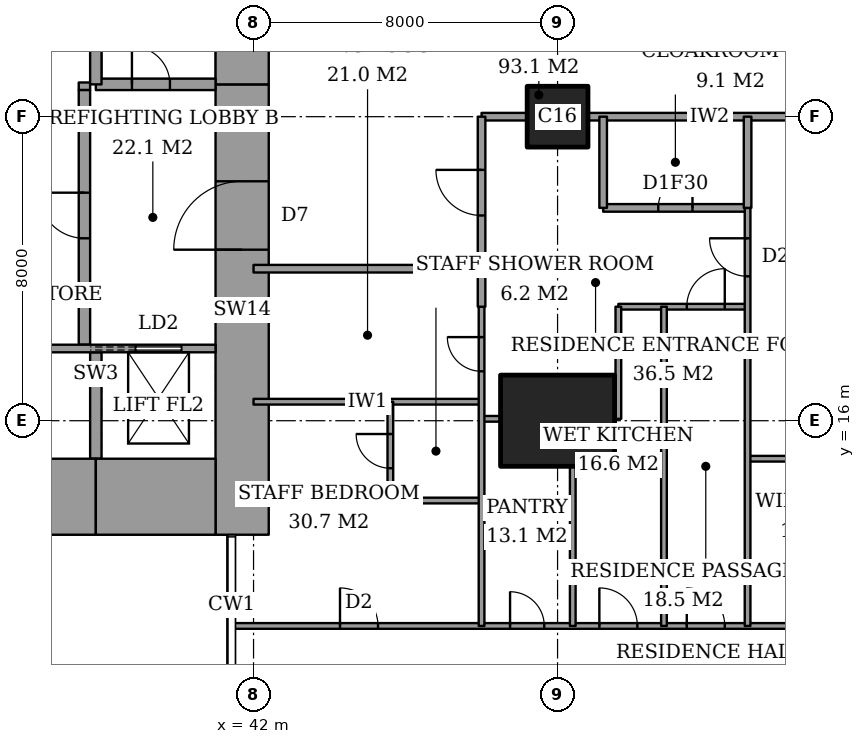
"""IFC4 building model, lengths in metres.
Left out: names, types, materials, properties, quantities, classifications, styles, units other than length and angle.
Written with IfcOpenShell. Run it as: python <this file> out.ifc"""

import sys

from ifc_helpers import new_model, si_unit, direction, frame, frame_2d, origin, origin_2d, place, context, subcontext, project, spatial, rectangle, extrude, element, fill, save


model = new_model("IFC4")
c1 = context("Model", 3, precision=1e-05, world=origin(), true_north=direction((0.0, 1.0)))
c2 = subcontext(c1, "Body", "Model", "MODEL_VIEW")
j1 = project(units=[si_unit("LENGTHUNIT", "METRE"), si_unit("PLANEANGLEUNIT", "RADIAN")], contexts=[c1])
p1 = place(None, origin())
s1 = spatial("IfcSite", under=j1, at=p1, CompositionType="ELEMENT")
p2 = place(p1, origin())
s2 = spatial("IfcBuilding", under=s1, at=p2, CompositionType="ELEMENT")
p3 = place(p2, frame((0.0, 0.0, 248.4)))
s3 = spatial("IfcBuildingStorey", under=s2, at=p3, CompositionType="ELEMENT", Elevation=248.4)
p4 = place(p3, frame((50.0, 16.0, 0.0), z_axis=(0.0, 0.0, 1.0), x_axis=(1.0, 0.0, 0.0)))
e1 = element("IfcColumn", 1, at=p4, inside=s3, PredefinedType="COLUMN", context=c2, shape_type="SweptSolid", body=[
    extrude(rectangle(XDim=3.0, YDim=2.4, at=origin_2d()), origin(), (0.0, 0.0, 1.0), 3.6),
])
p5 = place(p3, frame((50.0, 24.0, 0.0), z_axis=(0.0, 0.0, 1.0), x_axis=(1.0, 0.0, 0.0)))
e2 = element("IfcColumn", 2, at=p5, inside=s3, PredefinedType="COLUMN", context=c2, shape_type="SweptSolid", body=[
    extrude(rectangle(XDim=1.6, YDim=1.6, at=origin_2d()), origin(), (0.0, 0.0, 1.0), 3.6),
])
p6 = place(p3, frame((28.15, 14.0, 0.0), z_axis=(0.0, 0.0, 1.0), x_axis=(1.0, 0.0, 0.0)))
e3 = element("IfcWall", 3, at=p6, inside=s3, PredefinedType="SHEAR", context=c2, shape_type="SweptSolid", body=[
    extrude(rectangle(XDim=9.7, YDim=2.0, at=frame_2d((4.85, 0.0))), origin(), (0.0, 0.0, 1.0), 3.6),
])
p7 = place(p3, frame((37.85, 14.0, 0.0), z_axis=(0.0, 0.0, 1.0), x_axis=(1.0, 0.0, 0.0)))
e4 = element("IfcWall", 4, at=p7, inside=s3, PredefinedType="SHEAR", context=c2, shape_type="SweptSolid", body=[
    extrude(rectangle(XDim=3.15, YDim=2.0, at=frame_2d((1.575, 0.0))), origin(), (0.0, 0.0, 1.0), 3.6),
])
p8 = place(p3, frame((41.7, 13.0, 0.0), z_axis=(0.0, 0.0, 1.0), x_axis=(0.0, 1.0, 0.0)))
e5 = element("IfcWall", 5, at=p8, inside=s3, PredefinedType="SHEAR", context=c2, shape_type="SweptSolid", body=[
    extrude(rectangle(XDim=11.85, YDim=1.4, at=frame_2d((5.925, 0.0))), origin(), (0.0, 0.0, 1.0), 3.6),
])
p9 = place(p8, frame((7.5, 0.0, 0.0)))
e6 = element("IfcOpeningElement", 6, at=p9, cuts=e5, PredefinedType="OPENING", context=c2, shape_type="SweptSolid", body=[
    extrude(rectangle(XDim=1.8, YDim=2.4, at=frame_2d((0.9, 1.2))), frame((0.0, 0.71, 0.0), z_axis=(0.0, -1.0, 0.0), x_axis=(1.0, 0.0, 0.0)), (0.0, 0.0, 1.0), 1.42),
])
p10 = place(p3, frame((41.7, 24.85, 0.0), z_axis=(0.0, 0.0, 1.0), x_axis=(0.0, 1.0, 0.0)))
e7 = element("IfcWall", 7, at=p10, inside=s3, PredefinedType="SHEAR", context=c2, shape_type="SweptSolid", body=[
    extrude(rectangle(XDim=10.15, YDim=1.4, at=frame_2d((5.075, 0.0))), origin(), (0.0, 0.0, 1.0), 3.6),
])
p11 = place(p3, frame((37.85, 24.85, 0.0), z_axis=(0.0, 0.0, 1.0), x_axis=(0.0, 1.0, 0.0)))
e8 = element("IfcWall", 8, at=p11, inside=s3, PredefinedType="SHEAR", context=c2, shape_type="SweptSolid", body=[
    extrude(rectangle(XDim=8.15, YDim=0.3, at=frame_2d((4.075, 0.0))), origin(), (0.0, 0.0, 1.0), 3.6),
])
p12 = place(p3, frame((37.85, 24.85, 0.0), z_axis=(0.0, 0.0, 1.0), x_axis=(1.0, 0.0, 0.0)))
e9 = element("IfcWall", 9, at=p12, inside=s3, PredefinedType="SHEAR", context=c2, shape_type="SweptSolid", body=[
    extrude(rectangle(XDim=3.15, YDim=0.3, at=frame_2d((1.575, 0.0))), origin(), (0.0, 0.0, 1.0), 3.6),
])
p13 = place(p12, frame((0.95, 0.0, 0.0)))
e10 = element("IfcOpeningElement", 10, at=p13, cuts=e9, PredefinedType="OPENING", context=c2, shape_type="SweptSolid", body=[
    extrude(rectangle(XDim=1.0, YDim=2.1, at=frame_2d((0.5, 1.05))), frame((0.0, 0.16, 0.0), z_axis=(0.0, -1.0, 0.0), x_axis=(1.0, 0.0, 0.0)), (0.0, 0.0, 1.0), 0.32),
])
p14 = place(p3, frame((37.55, 18.0, 0.0), z_axis=(0.0, 0.0, 1.0), x_axis=(0.0, 1.0, 0.0)))
e11 = element("IfcWall", 11, at=p14, inside=s3, PredefinedType="PARTITIONING", context=c2, shape_type="SweptSolid", body=[
    extrude(rectangle(XDim=6.7, YDim=0.3, at=frame_2d((3.35, 0.0))), origin(), (0.0, 0.0, 1.0), 3.6),
])
p15 = place(p14, frame((2.8, 0.0, 0.0)))
e12 = element("IfcOpeningElement", 12, at=p15, cuts=e11, PredefinedType="OPENING", context=c2, shape_type="SweptSolid", body=[
    extrude(rectangle(XDim=1.2, YDim=2.1, at=frame_2d((0.6, 1.05))), frame((0.0, 0.16, 0.0), z_axis=(0.0, -1.0, 0.0), x_axis=(1.0, 0.0, 0.0)), (0.0, 0.0, 1.0), 0.32),
])
p16 = place(p3, frame((41.439, 10.6, 0.0), z_axis=(0.0, 0.0, 1.0), x_axis=(1.0, 0.0, 0.0)))
e13 = element("IfcWall", 13, at=p16, inside=s3, PredefinedType="PARTITIONING", context=c2, shape_type="SweptSolid", body=[
    extrude(rectangle(XDim=25.011, YDim=0.15, at=frame_2d((12.505, 0.0))), origin(), (0.0, 0.0, 1.0), 3.35),
])
p17 = place(p16, frame((11.961, 0.0, 0.0)))
e14 = element("IfcOpeningElement", 14, at=p17, cuts=e13, PredefinedType="OPENING", context=c2, shape_type="SweptSolid", body=[
    extrude(rectangle(XDim=1.0, YDim=2.1, at=frame_2d((0.5, 1.05))), frame((0.0, 0.085, 0.0), z_axis=(0.0, -1.0, 0.0), x_axis=(1.0, 0.0, 0.0)), (0.0, 0.0, 1.0), 0.17),
])
p18 = place(p16, frame((20.924, 0.0, 0.0)))
e15 = element("IfcOpeningElement", 15, at=p18, cuts=e13, PredefinedType="OPENING", context=c2, shape_type="SweptSolid", body=[
    extrude(rectangle(XDim=1.0, YDim=2.1, at=frame_2d((0.5, 1.05))), frame((0.0, 0.085, 0.0), z_axis=(0.0, -1.0, 0.0), x_axis=(1.0, 0.0, 0.0)), (0.0, 0.0, 1.0), 0.17),
])
p19 = place(p16, frame((15.249, 0.0, 0.0)))
e16 = element("IfcOpeningElement", 16, at=p19, cuts=e13, PredefinedType="OPENING", context=c2, shape_type="SweptSolid", body=[
    extrude(rectangle(XDim=0.9, YDim=2.1, at=frame_2d((0.45, 1.05))), frame((0.0, 0.085, 0.0), z_axis=(0.0, -1.0, 0.0), x_axis=(1.0, 0.0, 0.0)), (0.0, 0.0, 1.0), 0.17),
])
p20 = place(p16, frame((9.661, 0.0, 0.0)))
e17 = element("IfcOpeningElement", 17, at=p20, cuts=e13, PredefinedType="OPENING", context=c2, shape_type="SweptSolid", body=[
    extrude(rectangle(XDim=1.0, YDim=2.1, at=frame_2d((0.5, 1.05))), frame((0.0, 0.085, 0.0), z_axis=(0.0, -1.0, 0.0), x_axis=(1.0, 0.0, 0.0)), (0.0, 0.0, 1.0), 0.17),
])
p21 = place(p16, frame((7.311, 0.0, 0.0)))
e18 = element("IfcOpeningElement", 18, at=p21, cuts=e13, PredefinedType="OPENING", context=c2, shape_type="SweptSolid", body=[
    extrude(rectangle(XDim=0.9, YDim=2.1, at=frame_2d((0.45, 1.05))), frame((0.0, 0.085, 0.0), z_axis=(0.0, -1.0, 0.0), x_axis=(1.0, 0.0, 0.0)), (0.0, 0.0, 1.0), 0.17),
])
p22 = place(p16, frame((2.836, 0.0, 0.0)))
e19 = element("IfcOpeningElement", 19, at=p22, cuts=e13, PredefinedType="OPENING", context=c2, shape_type="SweptSolid", body=[
    extrude(rectangle(XDim=1.0, YDim=2.1, at=frame_2d((0.5, 1.05))), frame((0.0, 0.085, 0.0), z_axis=(0.0, -1.0, 0.0), x_axis=(1.0, 0.0, 0.0)), (0.0, 0.0, 1.0), 0.17),
])
p23 = place(p3, frame((45.6, 13.9, 0.0), z_axis=(0.0, 0.0, 1.0), x_axis=(1.0, 0.0, 0.0)))
e20 = element("IfcWall", 20, at=p23, inside=s3, PredefinedType="PARTITIONING", context=c2, shape_type="SweptSolid", body=[
    extrude(rectangle(XDim=2.4, YDim=0.15, at=frame_2d((1.2, 0.0))), origin(), (0.0, 0.0, 1.0), 3.35),
])
p24 = place(p3, frame((55.0, 15.0, 0.0), z_axis=(0.0, 0.0, 1.0), x_axis=(1.0, 0.0, 0.0)))
e21 = element("IfcWall", 21, at=p24, inside=s3, PredefinedType="PARTITIONING", context=c2, shape_type="SweptSolid", body=[
    extrude(rectangle(XDim=1.5, YDim=0.15, at=frame_2d((0.75, 0.0))), origin(), (0.0, 0.0, 1.0), 3.35),
])
p25 = place(p3, frame((48.0, 16.05, 0.0), z_axis=(0.0, 0.0, 1.0), x_axis=(1.0, 0.0, 0.0)))
e22 = element("IfcWall", 22, at=p25, inside=s3, PredefinedType="PARTITIONING", context=c2, shape_type="SweptSolid", body=[
    extrude(rectangle(XDim=0.5, YDim=0.15, at=frame_2d((0.25, 0.0))), origin(), (0.0, 0.0, 1.0), 2.634),
])
p26 = place(p3, frame((42.0, 16.5, 0.0), z_axis=(0.0, 0.0, 1.0), x_axis=(1.0, 0.0, 0.0)))
e23 = element("IfcWall", 23, at=p26, inside=s3, PredefinedType="PARTITIONING", context=c2, shape_type="SweptSolid", body=[
    extrude(rectangle(XDim=6.0, YDim=0.15, at=frame_2d((3.0, 0.0))), origin(), (0.0, 0.0, 1.0), 3.35),
])
p27 = place(p3, frame((51.6, 19.0, 0.0), z_axis=(0.0, 0.0, 1.0), x_axis=(1.0, 0.0, 0.0)))
e24 = element("IfcWall", 24, at=p27, inside=s3, PredefinedType="PARTITIONING", context=c2, shape_type="SweptSolid", body=[
    extrude(rectangle(XDim=3.4, YDim=0.15, at=frame_2d((1.7, 0.0))), origin(), (0.0, 0.0, 1.0), 3.35),
])
p28 = place(p27, frame((1.8, 0.0, 0.0)))
e25 = element("IfcOpeningElement", 25, at=p28, cuts=e24, PredefinedType="OPENING", context=c2, shape_type="SweptSolid", body=[
    extrude(rectangle(XDim=1.0, YDim=2.1, at=frame_2d((0.5, 1.05))), frame((0.0, 0.085, 0.0), z_axis=(0.0, -1.0, 0.0), x_axis=(1.0, 0.0, 0.0)), (0.0, 0.0, 1.0), 0.17),
])
p29 = place(p3, frame((42.0, 20.0, 0.0), z_axis=(0.0, 0.0, 1.0), x_axis=(1.0, 0.0, 0.0)))
e26 = element("IfcWall", 26, at=p29, inside=s3, PredefinedType="PARTITIONING", context=c2, shape_type="SweptSolid", body=[
    extrude(rectangle(XDim=6.0, YDim=0.2, at=frame_2d((3.0, 0.0))), origin(), (0.0, 0.0, 1.0), 3.35),
])
p30 = place(p3, frame((51.2, 21.6, 0.0), z_axis=(0.0, 0.0, 1.0), x_axis=(1.0, 0.0, 0.0)))
e27 = element("IfcWall", 27, at=p30, inside=s3, PredefinedType="PARTITIONING", context=c2, shape_type="SweptSolid", body=[
    extrude(rectangle(XDim=3.8, YDim=0.2, at=frame_2d((1.9, 0.0))), origin(), (0.0, 0.0, 1.0), 3.35),
])
p31 = place(p30, frame((1.45, 0.0, 0.0)))
e28 = element("IfcOpeningElement", 28, at=p31, cuts=e27, PredefinedType="OPENING", context=c2, shape_type="SweptSolid", body=[
    extrude(rectangle(XDim=0.9, YDim=2.1, at=frame_2d((0.45, 1.05))), frame((0.0, 0.11, 0.0), z_axis=(0.0, -1.0, 0.0), x_axis=(1.0, 0.0, 0.0)), (0.0, 0.0, 1.0), 0.22),
])
p32 = place(p3, frame((48.0, 24.0, 0.0), z_axis=(0.0, 0.0, 1.0), x_axis=(1.0, 0.0, 0.0)))
e29 = element("IfcWall", 29, at=p32, inside=s3, PredefinedType="PARTITIONING", context=c2, shape_type="SweptSolid", body=[
    extrude(rectangle(XDim=1.2, YDim=0.2, at=frame_2d((0.6, 0.0))), origin(), (0.0, 0.0, 1.0), 3.35),
])
p33 = place(p3, frame((50.8, 24.0, 0.0), z_axis=(0.0, 0.0, 1.0), x_axis=(1.0, 0.0, 0.0)))
e30 = element("IfcWall", 30, at=p33, inside=s3, PredefinedType="PARTITIONING", context=c2, shape_type="SweptSolid", body=[
    extrude(rectangle(XDim=6.4, YDim=0.2, at=frame_2d((3.2, 0.0))), origin(), (0.0, 0.0, 1.0), 3.35),
])
p34 = place(p3, frame((45.6, 13.9, 0.0), z_axis=(0.0, 0.0, 1.0), x_axis=(0.0, 1.0, 0.0)))
e31 = element("IfcWall", 31, at=p34, inside=s3, PredefinedType="PARTITIONING", context=c2, shape_type="SweptSolid", body=[
    extrude(rectangle(XDim=2.6, YDim=0.15, at=frame_2d((1.3, 0.0))), origin(), (0.0, 0.0, 1.0), 3.35),
])
p35 = place(p34, frame((0.85, 0.0, 0.0)))
e32 = element("IfcOpeningElement", 32, at=p35, cuts=e31, PredefinedType="OPENING", context=c2, shape_type="SweptSolid", body=[
    extrude(rectangle(XDim=0.9, YDim=2.1, at=frame_2d((0.45, 1.05))), frame((0.0, 0.085, 0.0), z_axis=(0.0, -1.0, 0.0), x_axis=(1.0, 0.0, 0.0)), (0.0, 0.0, 1.0), 0.17),
])
p36 = place(p3, frame((48.0, 19.0, 0.0), z_axis=(0.0, 0.0, 1.0), x_axis=(0.0, 1.0, 0.0)))
e33 = element("IfcWall", 33, at=p36, inside=s3, PredefinedType="PARTITIONING", context=c2, shape_type="SweptSolid", body=[
    extrude(rectangle(XDim=5.0, YDim=0.2, at=frame_2d((2.5, 0.0))), origin(), (0.0, 0.0, 1.0), 3.35),
])
p37 = place(p36, frame((2.4, 0.0, 0.0)))
e34 = element("IfcOpeningElement", 34, at=p37, cuts=e33, PredefinedType="OPENING", context=c2, shape_type="SweptSolid", body=[
    extrude(rectangle(XDim=1.2, YDim=2.4, at=frame_2d((0.6, 1.2))), frame((0.0, 0.11, 0.0), z_axis=(0.0, -1.0, 0.0), x_axis=(1.0, 0.0, 0.0)), (0.0, 0.0, 1.0), 0.22),
])
p38 = place(p3, frame((48.0, 10.6, 0.0), z_axis=(0.0, 0.0, 1.0), x_axis=(0.0, 1.0, 0.0)))
e35 = element("IfcWall", 35, at=p38, inside=s3, PredefinedType="PARTITIONING", context=c2, shape_type="SweptSolid", body=[
    extrude(rectangle(XDim=8.4, YDim=0.15, at=frame_2d((4.2, 0.0))), origin(), (0.0, 0.0, 1.0), 3.35),
])
p39 = place(p38, frame((6.7, 0.0, 0.0)))
e36 = element("IfcOpeningElement", 36, at=p39, cuts=e35, PredefinedType="OPENING", context=c2, shape_type="SweptSolid", body=[
    extrude(rectangle(XDim=0.9, YDim=2.1, at=frame_2d((0.45, 1.05))), frame((0.0, 0.085, 0.0), z_axis=(0.0, -1.0, 0.0), x_axis=(1.0, 0.0, 0.0)), (0.0, 0.0, 1.0), 0.17),
])
p40 = place(p3, frame((50.4, 10.6, 0.0), z_axis=(0.0, 0.0, 1.0), x_axis=(0.0, 1.0, 0.0)))
e37 = element("IfcWall", 37, at=p40, inside=s3, PredefinedType="PARTITIONING", context=c2, shape_type="SweptSolid", body=[
    extrude(rectangle(XDim=4.2, YDim=0.15, at=frame_2d((2.1, 0.0))), origin(), (0.0, 0.0, 1.0), 3.35),
])
p41 = place(p3, frame((51.2, 21.6, 0.0), z_axis=(0.0, 0.0, 1.0), x_axis=(0.0, 1.0, 0.0)))
e38 = element("IfcWall", 38, at=p41, inside=s3, PredefinedType="PARTITIONING", context=c2, shape_type="SweptSolid", body=[
    extrude(rectangle(XDim=2.4, YDim=0.2, at=frame_2d((1.2, 0.0))), origin(), (0.0, 0.0, 1.0), 3.35),
])
p42 = place(p3, frame((51.6, 16.05, 0.0), z_axis=(0.0, 0.0, 1.0), x_axis=(0.0, 1.0, 0.0)))
e39 = element("IfcWall", 39, at=p42, inside=s3, PredefinedType="PARTITIONING", context=c2, shape_type="SweptSolid", body=[
    extrude(rectangle(XDim=2.95, YDim=0.15, at=frame_2d((1.475, 0.0))), origin(), (0.0, 0.0, 1.0), 3.35),
])
p43 = place(p3, frame((52.8, 10.6, 0.0), z_axis=(0.0, 0.0, 1.0), x_axis=(0.0, 1.0, 0.0)))
e40 = element("IfcWall", 40, at=p43, inside=s3, PredefinedType="PARTITIONING", context=c2, shape_type="SweptSolid", body=[
    extrude(rectangle(XDim=8.4, YDim=0.15, at=frame_2d((4.2, 0.0))), origin(), (0.0, 0.0, 1.0), 3.35),
])
p44 = place(p3, frame((55.0, 21.6, 0.0), z_axis=(0.0, 0.0, 1.0), x_axis=(0.0, 1.0, 0.0)))
e41 = element("IfcWall", 41, at=p44, inside=s3, PredefinedType="PARTITIONING", context=c2, shape_type="SweptSolid", body=[
    extrude(rectangle(XDim=2.4, YDim=0.2, at=frame_2d((1.2, 0.0))), origin(), (0.0, 0.0, 1.0), 3.35),
])
p45 = place(p3, frame((55.0, 10.6, 0.0), z_axis=(0.0, 0.0, 1.0), x_axis=(0.0, 1.0, 0.0)))
e42 = element("IfcWall", 42, at=p45, inside=s3, PredefinedType="PARTITIONING", context=c2, shape_type="SweptSolid", body=[
    extrude(rectangle(XDim=11.0, YDim=0.15, at=frame_2d((5.5, 0.0))), origin(), (0.0, 0.0, 1.0), 3.35),
])
p46 = place(p45, frame((9.2, 0.0, 0.0)))
e43 = element("IfcOpeningElement", 43, at=p46, cuts=e42, PredefinedType="OPENING", context=c2, shape_type="SweptSolid", body=[
    extrude(rectangle(XDim=1.0, YDim=2.1, at=frame_2d((0.5, 1.05))), frame((0.0, 0.085, 0.0), z_axis=(0.0, -1.0, 0.0), x_axis=(1.0, 0.0, 0.0)), (0.0, 0.0, 1.0), 0.17),
])
p47 = place(p3, frame((28.3, 17.9, 0.0), z_axis=(0.0, 0.0, 1.0), x_axis=(1.0, 0.0, 0.0)))
e44 = element("IfcWall", 44, at=p47, inside=s3, PredefinedType="PARTITIONING", context=c2, shape_type="SweptSolid", body=[
    extrude(rectangle(XDim=12.7, YDim=0.2, at=frame_2d((6.35, 0.0))), origin(), (0.0, 0.0, 1.0), 3.6),
])
p48 = place(p47, frame((1.05, 0.0, 0.0)))
e45 = element("IfcOpeningElement", 45, at=p48, cuts=e44, PredefinedType="OPENING", context=c2, shape_type="SweptSolid", body=[
    extrude(rectangle(XDim=0.9, YDim=2.1, at=frame_2d((0.45, 1.05))), frame((0.0, 0.11, 0.0), z_axis=(0.0, -1.0, 0.0), x_axis=(1.0, 0.0, 0.0)), (0.0, 0.0, 1.0), 0.22),
])
p49 = place(p47, frame((7.45, 0.0, 0.0)))
e46 = element("IfcOpeningElement", 46, at=p49, cuts=e44, PredefinedType="OPENING", context=c2, shape_type="SweptSolid", body=[
    extrude(rectangle(XDim=0.9, YDim=2.1, at=frame_2d((0.45, 1.05))), frame((0.0, 0.11, 0.0), z_axis=(0.0, -1.0, 0.0), x_axis=(1.0, 0.0, 0.0)), (0.0, 0.0, 1.0), 0.22),
])
p50 = place(p47, frame((10.6, 0.0, 0.0)))
e47 = element("IfcOpeningElement", 47, at=p50, cuts=e44, PredefinedType="OPENING", context=c2, shape_type="SweptSolid", body=[
    extrude(rectangle(XDim=1.2, YDim=2.1, at=frame_2d((0.6, 1.05))), frame((0.0, 0.11, 0.0), z_axis=(0.0, -1.0, 0.0), x_axis=(1.0, 0.0, 0.0)), (0.0, 0.0, 1.0), 0.22),
])
p51 = place(p3, frame((37.85, 15.0, 0.0), z_axis=(0.0, 0.0, 1.0), x_axis=(0.0, 1.0, 0.0)))
e48 = element("IfcWall", 48, at=p51, inside=s3, PredefinedType="SHEAR", context=c2, shape_type="SweptSolid", body=[
    extrude(rectangle(XDim=2.8, YDim=0.3, at=frame_2d((1.4, 0.0))), origin(), (0.0, 0.0, 1.0), 3.6),
])
p52 = place(p3, frame((37.4, 24.8, 0.0), z_axis=(0.0, 0.0, 1.0), x_axis=(1.0, 0.0, 0.0)))
e49 = element("IfcWall", 49, at=p52, inside=s3, PredefinedType="PARTITIONING", context=c2, shape_type="SweptSolid", body=[
    extrude(rectangle(XDim=0.3, YDim=0.2, at=frame_2d((0.15, 0.0))), origin(), (0.0, 0.0, 1.0), 3.6),
])
p53 = place(p17, origin())
e50 = element("IfcDoor", 50, at=p53, inside=s3, OperationType="SINGLE_SWING_RIGHT", PredefinedType="DOOR", context=c2, shape_type="SweptSolid", body=[
    extrude(rectangle(XDim=1.0, YDim=2.1, at=frame_2d((0.5, 1.05))), frame((0.0, 0.025, 0.0), z_axis=(0.0, -1.0, 0.0), x_axis=(1.0, 0.0, 0.0)), (0.0, 0.0, 1.0), 0.05),
])
fill(e14, e50)
p54 = place(p46, origin())
e51 = element("IfcDoor", 51, at=p54, inside=s3, OperationType="SINGLE_SWING_LEFT", PredefinedType="DOOR", context=c2, shape_type="SweptSolid", body=[
    extrude(rectangle(XDim=1.0, YDim=2.1, at=frame_2d((0.5, 1.05))), frame((0.0, 0.025, 0.0), z_axis=(0.0, -1.0, 0.0), x_axis=(1.0, 0.0, 0.0)), (0.0, 0.0, 1.0), 0.05),
])
fill(e43, e51)
p55 = place(p31, origin())
e52 = element("IfcDoor", 52, at=p55, inside=s3, OperationType="SINGLE_SWING_LEFT", PredefinedType="DOOR", context=c2, shape_type="SweptSolid", body=[
    extrude(rectangle(XDim=0.9, YDim=2.1, at=frame_2d((0.45, 1.05))), frame((0.0, 0.025, 0.0), z_axis=(0.0, -1.0, 0.0), x_axis=(1.0, 0.0, 0.0)), (0.0, 0.0, 1.0), 0.05),
])
fill(e28, e52)
p56 = place(p37, origin())
e53 = element("IfcDoor", 53, at=p56, inside=s3, OperationType="SINGLE_SWING_LEFT", PredefinedType="DOOR", context=c2, shape_type="SweptSolid", body=[
    extrude(rectangle(XDim=1.2, YDim=2.4, at=frame_2d((0.6, 1.2))), frame((0.0, 0.025, 0.0), z_axis=(0.0, -1.0, 0.0), x_axis=(1.0, 0.0, 0.0)), (0.0, 0.0, 1.0), 0.05),
])
fill(e34, e53)
p57 = place(p28, origin())
e54 = element("IfcDoor", 54, at=p57, inside=s3, OperationType="SINGLE_SWING_LEFT", PredefinedType="DOOR", context=c2, shape_type="SweptSolid", body=[
    extrude(rectangle(XDim=1.0, YDim=2.1, at=frame_2d((0.5, 1.05))), frame((0.0, 0.025, 0.0), z_axis=(0.0, -1.0, 0.0), x_axis=(1.0, 0.0, 0.0)), (0.0, 0.0, 1.0), 0.05),
])
fill(e25, e54)
p58 = place(p20, origin())
e55 = element("IfcDoor", 55, at=p58, inside=s3, OperationType="SINGLE_SWING_RIGHT", PredefinedType="DOOR", context=c2, shape_type="SweptSolid", body=[
    extrude(rectangle(XDim=1.0, YDim=2.1, at=frame_2d((0.5, 1.05))), frame((0.0, 0.025, 0.0), z_axis=(0.0, -1.0, 0.0), x_axis=(1.0, 0.0, 0.0)), (0.0, 0.0, 1.0), 0.05),
])
fill(e17, e55)
p59 = place(p21, origin())
e56 = element("IfcDoor", 56, at=p59, inside=s3, OperationType="SINGLE_SWING_RIGHT", PredefinedType="DOOR", context=c2, shape_type="SweptSolid", body=[
    extrude(rectangle(XDim=0.9, YDim=2.1, at=frame_2d((0.45, 1.05))), frame((0.0, 0.025, 0.0), z_axis=(0.0, -1.0, 0.0), x_axis=(1.0, 0.0, 0.0)), (0.0, 0.0, 1.0), 0.05),
])
fill(e18, e56)
p60 = place(p35, origin())
e57 = element("IfcDoor", 57, at=p60, inside=s3, OperationType="SINGLE_SWING_LEFT", PredefinedType="DOOR", context=c2, shape_type="SweptSolid", body=[
    extrude(rectangle(XDim=0.9, YDim=2.1, at=frame_2d((0.45, 1.05))), frame((0.0, 0.025, 0.0), z_axis=(0.0, -1.0, 0.0), x_axis=(1.0, 0.0, 0.0)), (0.0, 0.0, 1.0), 0.05),
])
fill(e32, e57)
p61 = place(p22, origin())
e58 = element("IfcDoor", 58, at=p61, inside=s3, OperationType="SINGLE_SWING_RIGHT", PredefinedType="DOOR", context=c2, shape_type="SweptSolid", body=[
    extrude(rectangle(XDim=1.0, YDim=2.1, at=frame_2d((0.5, 1.05))), frame((0.0, 0.025, 0.0), z_axis=(0.0, -1.0, 0.0), x_axis=(1.0, 0.0, 0.0)), (0.0, 0.0, 1.0), 0.05),
])
fill(e19, e58)
p62 = place(p39, origin())
e59 = element("IfcDoor", 59, at=p62, inside=s3, OperationType="SINGLE_SWING_LEFT", PredefinedType="DOOR", context=c2, shape_type="SweptSolid", body=[
    extrude(rectangle(XDim=0.9, YDim=2.1, at=frame_2d((0.45, 1.05))), frame((0.0, 0.025, 0.0), z_axis=(0.0, -1.0, 0.0), x_axis=(1.0, 0.0, 0.0)), (0.0, 0.0, 1.0), 0.05),
])
fill(e36, e59)
p63 = place(p13, origin())
e60 = element("IfcDoor", 60, at=p63, inside=s3, OperationType="SINGLE_SWING_RIGHT", PredefinedType="DOOR", context=c2, shape_type="SweptSolid", body=[
    extrude(rectangle(XDim=1.0, YDim=2.1, at=frame_2d((0.5, 1.05))), frame((0.0, 0.025, 0.0), z_axis=(0.0, -1.0, 0.0), x_axis=(1.0, 0.0, 0.0)), (0.0, 0.0, 1.0), 0.05),
])
fill(e10, e60)
p64 = place(p15, origin())
e61 = element("IfcDoor", 61, at=p64, inside=s3, OperationType="SINGLE_SWING_LEFT", PredefinedType="DOOR", context=c2, shape_type="SweptSolid", body=[
    extrude(rectangle(XDim=1.2, YDim=2.1, at=frame_2d((0.6, 1.05))), frame((0.0, 0.025, 0.0), z_axis=(0.0, -1.0, 0.0), x_axis=(1.0, 0.0, 0.0)), (0.0, 0.0, 1.0), 0.05),
])
fill(e12, e61)
p65 = place(p9, origin())
e62 = element("IfcDoor", 62, at=p65, inside=s3, OperationType="DOUBLE_DOOR_DOUBLE_SWING", PredefinedType="DOOR", context=c2, shape_type="SweptSolid", body=[
    extrude(rectangle(XDim=1.8, YDim=2.4, at=frame_2d((0.9, 1.2))), frame((0.0, 0.025, 0.0), z_axis=(0.0, -1.0, 0.0), x_axis=(1.0, 0.0, 0.0)), (0.0, 0.0, 1.0), 0.05),
])
fill(e6, e62)
p66 = place(p50, origin())
e63 = element("IfcDoor", 63, at=p66, inside=s3, OperationType="SLIDING_TO_LEFT", PredefinedType="DOOR", context=c2, shape_type="SweptSolid", body=[
    extrude(rectangle(XDim=1.2, YDim=2.1, at=frame_2d((0.6, 1.05))), frame((0.0, 0.025, 0.0), z_axis=(0.0, -1.0, 0.0), x_axis=(1.0, 0.0, 0.0)), (0.0, 0.0, 1.0), 0.05),
])
fill(e47, e63)
save(model, sys.argv[1])
